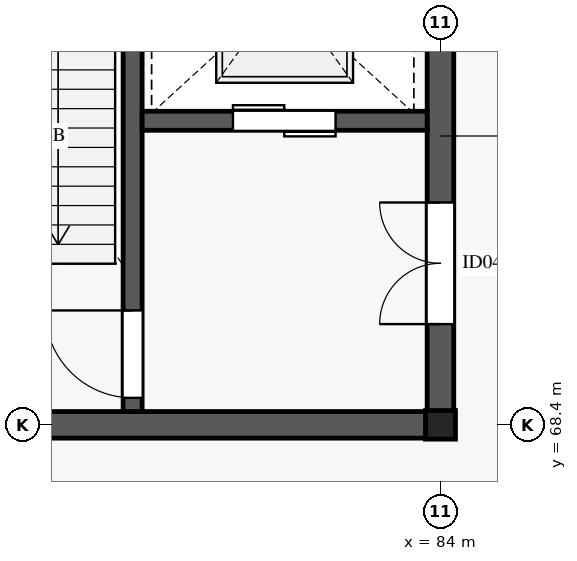
"""IFC4 building model, lengths in metres.
Left out: names, types, materials, properties, quantities, classifications, styles, units other than length and angle.
Written with IfcOpenShell. Run it as: python <this file> out.ifc"""

import sys

from ifc_helpers import new_model, si_unit, direction, frame, frame_2d, origin, origin_2d, place, context, subcontext, project, spatial, rectangle, i_section, extrude, element, fill, save


model = new_model("IFC4")
c1 = context("Model", 3, precision=1e-05, world=origin(), true_north=direction((0.0, 1.0)))
c2 = subcontext(c1, "Body", "Model", "MODEL_VIEW")
j1 = project(units=[si_unit("LENGTHUNIT", "METRE"), si_unit("PLANEANGLEUNIT", "RADIAN")], contexts=[c1])
p1 = place(None, origin())
s1 = spatial("IfcSite", under=j1, at=p1, CompositionType="ELEMENT")
p2 = place(p1, origin())
s2 = spatial("IfcBuilding", under=s1, at=p2, CompositionType="ELEMENT")
p3 = place(p2, frame((0.0, 0.0, 5.4)))
s3 = spatial("IfcBuildingStorey", under=s2, at=p3, CompositionType="ELEMENT", Elevation=5.4)
p4 = place(p3, frame((84.0, 68.4, 0.0), z_axis=(0.0, 0.0, 1.0), x_axis=(1.0, 0.0, 0.0)))
e1 = element("IfcColumn", 1, at=p4, inside=s3, PredefinedType="COLUMN", context=c2, shape_type="SweptSolid", body=[
    extrude(i_section(OverallWidth=0.394, OverallDepth=0.376, WebThickness=0.017, FlangeThickness=0.028, FilletRadius=0.015, at=origin_2d()), origin(), (0.0, 0.0, 1.0), 5.185),
])
p5 = place(p3, frame((75.825, 68.4, 0.0), z_axis=(0.0, 0.0, 1.0), x_axis=(1.0, 0.0, 0.0)))
e2 = element("IfcWall", 2, at=p5, inside=s3, PredefinedType="SHEAR", context=c2, shape_type="SweptSolid", body=[
    extrude(rectangle(XDim=8.35, YDim=0.35, at=frame_2d((4.175, 0.0))), origin(), (0.0, 0.0, 1.0), 5.19),
])
p6 = place(p3, frame((84.0, 68.575, 0.0), z_axis=(0.0, 0.0, 1.0), x_axis=(0.0, 1.0, 0.0)))
e3 = element("IfcWall", 3, at=p6, inside=s3, PredefinedType="SHEAR", context=c2, shape_type="SweptSolid", body=[
    extrude(rectangle(XDim=7.25, YDim=0.35, at=frame_2d((3.625, 0.0))), origin(), (0.0, 0.0, 1.0), 5.19),
])
p7 = place(p6, frame((1.15, 0.0, 0.0)))
e4 = element("IfcOpeningElement", 4, at=p7, cuts=e3, PredefinedType="OPENING", context=c2, shape_type="SweptSolid", body=[
    extrude(rectangle(XDim=1.6, YDim=2.35, at=frame_2d((0.8, 1.175))), frame((0.0, 0.185, 0.0), z_axis=(0.0, -1.0, 0.0), x_axis=(1.0, 0.0, 0.0)), (0.0, 0.0, 1.0), 0.37),
])
p8 = place(p3, frame((79.95, 68.575, 0.0), z_axis=(0.0, 0.0, 1.0), x_axis=(0.0, 1.0, 0.0)))
e5 = element("IfcWall", 5, at=p8, inside=s3, PredefinedType="SHEAR", context=c2, shape_type="SweptSolid", body=[
    extrude(rectangle(XDim=7.25, YDim=0.25, at=frame_2d((3.625, 0.0))), origin(), (0.0, 0.0, 1.0), 5.19),
])
p9 = place(p8, frame((0.18, 0.0, 0.0)))
e6 = element("IfcOpeningElement", 6, at=p9, cuts=e5, PredefinedType="OPENING", context=c2, shape_type="SweptSolid", body=[
    extrude(rectangle(XDim=1.15, YDim=2.2, at=frame_2d((0.575, 1.1))), frame((0.0, 0.135, 0.0), z_axis=(0.0, -1.0, 0.0), x_axis=(1.0, 0.0, 0.0)), (0.0, 0.0, 1.0), 0.27),
])
p10 = place(p3, frame((80.075, 72.4, 0.0), z_axis=(0.0, 0.0, 1.0), x_axis=(1.0, 0.0, 0.0)))
e7 = element("IfcWall", 7, at=p10, inside=s3, PredefinedType="SHEAR", context=c2, shape_type="SweptSolid", body=[
    extrude(rectangle(XDim=3.75, YDim=0.25, at=frame_2d((1.875, 0.0))), origin(), (0.0, 0.0, 1.0), 5.19),
])
p11 = place(p10, frame((1.195, 0.0, 0.0)))
e8 = element("IfcOpeningElement", 8, at=p11, cuts=e7, PredefinedType="OPENING", context=c2, shape_type="SweptSolid", body=[
    extrude(rectangle(XDim=1.35, YDim=2.2, at=frame_2d((0.675, 1.1))), frame((0.0, 0.135, 0.0), z_axis=(0.0, -1.0, 0.0), x_axis=(1.0, 0.0, 0.0)), (0.0, 0.0, 1.0), 0.27),
])
p12 = place(p9, origin())
e9 = element("IfcDoor", 9, at=p12, inside=s3, OperationType="SINGLE_SWING_RIGHT", PredefinedType="DOOR", context=c2, shape_type="SweptSolid", body=[
    extrude(rectangle(XDim=1.15, YDim=2.2, at=frame_2d((0.575, 1.1))), frame((0.0, 0.025, 0.0), z_axis=(0.0, -1.0, 0.0), x_axis=(1.0, 0.0, 0.0)), (0.0, 0.0, 1.0), 0.05),
])
fill(e6, e9)
p13 = place(p7, origin())
e10 = element("IfcDoor", 10, at=p13, inside=s3, OperationType="DOUBLE_DOOR_SINGLE_SWING", PredefinedType="DOOR", context=c2, shape_type="SweptSolid", body=[
    extrude(rectangle(XDim=1.6, YDim=2.35, at=frame_2d((0.8, 1.175))), frame((0.0, 0.025, 0.0), z_axis=(0.0, -1.0, 0.0), x_axis=(1.0, 0.0, 0.0)), (0.0, 0.0, 1.0), 0.05),
])
fill(e4, e10)
p14 = place(p11, origin())
e11 = element("IfcDoor", 11, at=p14, inside=s3, OperationType="DOUBLE_DOOR_SLIDING", PredefinedType="DOOR", context=c2, shape_type="SweptSolid", body=[
    extrude(rectangle(XDim=1.35, YDim=2.2, at=frame_2d((0.675, 1.1))), frame((0.0, 0.025, 0.0), z_axis=(0.0, -1.0, 0.0), x_axis=(1.0, 0.0, 0.0)), (0.0, 0.0, 1.0), 0.05),
])
fill(e8, e11)
save(model, sys.argv[1])
